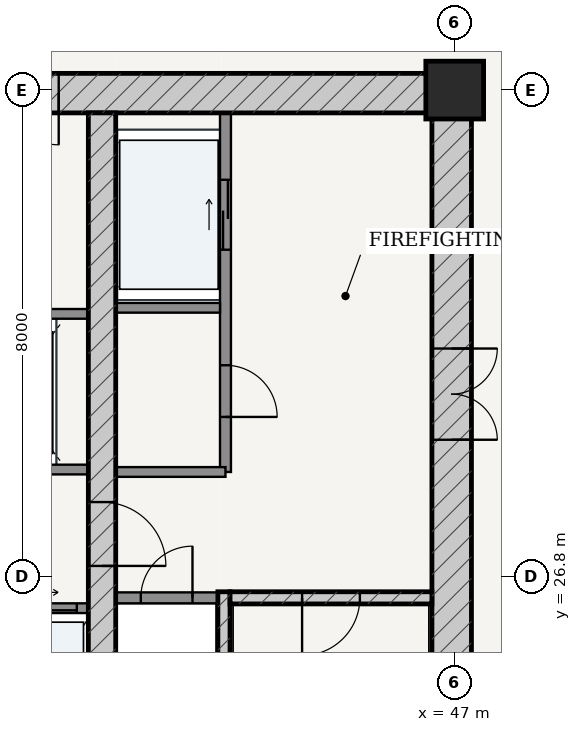
"""IFC4 building model, lengths in metres.
Left out: names, types, materials, properties, quantities, classifications, styles, units other than length and angle.
Written with IfcOpenShell. Run it as: python <this file> out.ifc"""

import sys

from ifc_helpers import new_model, si_unit, direction, frame, frame_2d, origin, origin_2d, place, context, subcontext, project, spatial, rectangle, extrude, source, transform, mapped, element, fill, save


model = new_model("IFC4")
c1 = context("Model", 3, precision=1e-05, world=origin(), true_north=direction((-0.2419218956, 0.970295726276)))
c2 = subcontext(c1, "Body", "Model", "MODEL_VIEW")
j1 = project(units=[si_unit("LENGTHUNIT", "METRE"), si_unit("PLANEANGLEUNIT", "RADIAN")], contexts=[c1])
p1 = place(None, origin())
s1 = spatial("IfcSite", under=j1, at=p1, CompositionType="ELEMENT")
p2 = place(p1, origin())
s2 = spatial("IfcBuilding", under=s1, at=p2, CompositionType="ELEMENT")
p3 = place(p2, frame((0.0, 0.0, 130.2)))
s3 = spatial("IfcBuildingStorey", under=s2, at=p3, CompositionType="ELEMENT", Elevation=130.2)
p4 = place(p3, frame((47.0, 34.8, 0.0), z_axis=(0.0, 0.0, 1.0), x_axis=(1.0, 0.0, 0.0)))
e1 = element("IfcColumn", 1, at=p4, inside=s3, PredefinedType="COLUMN", context=c2, shape_type="SweptSolid", body=[
    extrude(rectangle(XDim=0.95, YDim=0.95, at=origin_2d()), origin(), (0.0, 0.0, 1.0), 5.2),
])
p5 = place(p3, frame((28.725, 34.75, 0.0), z_axis=(0.0, 0.0, 1.0), x_axis=(1.0, 0.0, 0.0)))
e2 = element("IfcWall", 2, at=p5, inside=s3, PredefinedType="SHEAR", context=c2, shape_type="SweptSolid", body=[
    extrude(rectangle(XDim=18.55, YDim=0.65, at=frame_2d((9.275, 0.0))), origin(), (0.0, 0.0, 1.0), 4.93),
])
p6 = place(p5, frame((6.788, 0.0, 0.0)))
e3 = element("IfcOpeningElement", 3, at=p6, cuts=e2, PredefinedType="OPENING", context=c2, shape_type="SweptSolid", body=[
    extrude(rectangle(XDim=0.85, YDim=2.1, at=frame_2d((0.425, 1.05))), frame((0.0, 0.335, 0.0), z_axis=(0.0, -1.0, 0.0), x_axis=(1.0, 0.0, 0.0)), (0.0, 0.0, 1.0), 0.67),
])
p7 = place(p5, frame((8.845, 0.0, 0.0)))
e4 = element("IfcOpeningElement", 4, at=p7, cuts=e2, PredefinedType="OPENING", context=c2, shape_type="SweptSolid", body=[
    extrude(rectangle(XDim=0.86, YDim=2.1, at=frame_2d((0.43, 1.05))), frame((0.0, 0.335, 0.0), z_axis=(0.0, -1.0, 0.0), x_axis=(1.0, 0.0, 0.0)), (0.0, 0.0, 1.0), 0.67),
])
p8 = place(p5, frame((10.913, 0.0, 0.0)))
e5 = element("IfcOpeningElement", 5, at=p8, cuts=e2, PredefinedType="OPENING", context=c2, shape_type="SweptSolid", body=[
    extrude(rectangle(XDim=0.85, YDim=2.1, at=frame_2d((0.425, 1.05))), frame((0.0, 0.335, 0.0), z_axis=(0.0, -1.0, 0.0), x_axis=(1.0, 0.0, 0.0)), (0.0, 0.0, 1.0), 0.67),
])
p9 = place(p3, frame((46.95, 19.175, 0.0), z_axis=(0.0, 0.0, 1.0), x_axis=(0.0, 1.0, 0.0)))
e6 = element("IfcWall", 6, at=p9, inside=s3, PredefinedType="SHEAR", context=c2, shape_type="SweptSolid", body=[
    extrude(rectangle(XDim=15.25, YDim=0.65, at=frame_2d((7.625, 0.0))), origin(), (0.0, 0.0, 1.0), 4.93),
])
p10 = place(p9, frame((9.875, 0.0, 0.0)))
e7 = element("IfcOpeningElement", 7, at=p10, cuts=e6, PredefinedType="OPENING", context=c2, shape_type="SweptSolid", body=[
    extrude(rectangle(XDim=1.5, YDim=2.2, at=frame_2d((0.75, 1.1))), frame((0.0, 0.335, 0.0), z_axis=(0.0, -1.0, 0.0), x_axis=(1.0, 0.0, 0.0)), (0.0, 0.0, 1.0), 0.67),
])
p11 = place(p3, frame((43.205, 19.175, 0.0), z_axis=(0.0, 0.0, 1.0), x_axis=(0.0, 1.0, 0.0)))
e8 = element("IfcWall", 8, at=p11, inside=s3, PredefinedType="SOLIDWALL", context=c2, shape_type="SweptSolid", body=[
    extrude(rectangle(XDim=7.375, YDim=0.2, at=frame_2d((3.688, 0.0))), origin(), (0.0, 0.0, 1.0), 4.93),
])
p12 = place(p3, frame((43.305, 26.45, 0.0), z_axis=(0.0, 0.0, 1.0), x_axis=(1.0, 0.0, 0.0)))
e9 = element("IfcWall", 9, at=p12, inside=s3, PredefinedType="SOLIDWALL", context=c2, shape_type="SweptSolid", body=[
    extrude(rectangle(XDim=3.32, YDim=0.2, at=frame_2d((1.66, 0.0))), origin(), (0.0, 0.0, 1.0), 4.93),
])
p13 = place(p12, frame((1.185, 0.0, 0.0)))
e10 = element("IfcOpeningElement", 10, at=p13, cuts=e9, PredefinedType="OPENING", context=c2, shape_type="SweptSolid", body=[
    extrude(rectangle(XDim=0.95, YDim=2.15, at=frame_2d((0.475, 1.075))), frame((0.0, 0.11, 0.0), z_axis=(0.0, -1.0, 0.0), x_axis=(1.0, 0.0, 0.0)), (0.0, 0.0, 1.0), 0.22),
])
p14 = place(p3, frame((41.2, 19.175, 0.0), z_axis=(0.0, 0.0, 1.0), x_axis=(0.0, 1.0, 0.0)))
e11 = element("IfcWall", 11, at=p14, inside=s3, PredefinedType="SHEAR", context=c2, shape_type="SweptSolid", body=[
    extrude(rectangle(XDim=15.25, YDim=0.45, at=frame_2d((7.625, 0.0))), origin(), (0.0, 0.0, 1.0), 4.93),
])
p15 = place(p14, frame((7.8, 0.0, 0.0)))
e12 = element("IfcOpeningElement", 12, at=p15, cuts=e11, PredefinedType="OPENING", context=c2, shape_type="SweptSolid", body=[
    extrude(rectangle(XDim=1.05, YDim=2.15, at=frame_2d((0.525, 1.075))), frame((0.0, 0.235, 0.0), z_axis=(0.0, -1.0, 0.0), x_axis=(1.0, 0.0, 0.0)), (0.0, 0.0, 1.0), 0.47),
])
p16 = place(p3, frame((41.425, 26.45, 0.0), z_axis=(0.0, 0.0, 1.0), x_axis=(1.0, 0.0, 0.0)))
e13 = element("IfcWall", 13, at=p16, inside=s3, PredefinedType="PARTITIONING", context=c2, shape_type="SweptSolid", body=[
    extrude(rectangle(XDim=1.675, YDim=0.18, at=frame_2d((0.837, 0.0))), origin(), (0.0, 0.0, 1.0), 4.93),
])
p17 = place(p16, frame((0.413, 0.0, 0.0)))
e14 = element("IfcOpeningElement", 14, at=p17, cuts=e13, PredefinedType="OPENING", context=c2, shape_type="SweptSolid", body=[
    extrude(rectangle(XDim=0.85, YDim=2.1, at=frame_2d((0.425, 1.05))), frame((0.0, 0.1, 0.0), z_axis=(0.0, -1.0, 0.0), x_axis=(1.0, 0.0, 0.0)), (0.0, 0.0, 1.0), 0.2),
])
p18 = place(p3, frame((43.23, 28.52, 0.0), z_axis=(0.0, 0.0, 1.0), x_axis=(0.0, 1.0, 0.0)))
e15 = element("IfcWall", 15, at=p18, inside=s3, PredefinedType="PARTITIONING", context=c2, shape_type="SweptSolid", body=[
    extrude(rectangle(XDim=5.905, YDim=0.18, at=frame_2d((2.953, 0.0))), origin(), (0.0, 0.0, 1.0), 4.93),
])
p19 = place(p18, frame((0.905, 0.0, 0.0)))
e16 = element("IfcOpeningElement", 16, at=p19, cuts=e15, PredefinedType="OPENING", context=c2, shape_type="SweptSolid", body=[
    extrude(rectangle(XDim=0.85, YDim=2.1, at=frame_2d((0.425, 1.05))), frame((0.0, 0.1, 0.0), z_axis=(0.0, -1.0, 0.0), x_axis=(1.0, 0.0, 0.0)), (0.0, 0.0, 1.0), 0.2),
])
p20 = place(p18, frame((3.655, 0.0, 0.0)))
e17 = element("IfcOpeningElement", 17, at=p20, cuts=e15, PredefinedType="OPENING", context=c2, shape_type="SweptSolid", body=[
    extrude(rectangle(XDim=1.15, YDim=2.2, at=frame_2d((0.575, 1.1))), frame((0.0, 0.1, 0.0), z_axis=(0.0, -1.0, 0.0), x_axis=(1.0, 0.0, 0.0)), (0.0, 0.0, 1.0), 0.2),
])
p21 = place(p3, frame((41.425, 31.22, 0.0), z_axis=(0.0, 0.0, 1.0), x_axis=(1.0, 0.0, 0.0)))
e18 = element("IfcWall", 18, at=p21, inside=s3, PredefinedType="PARTITIONING", context=c2, shape_type="SweptSolid", body=[
    extrude(rectangle(XDim=1.715, YDim=0.16, at=frame_2d((0.857, 0.0))), origin(), (0.0, 0.0, 1.0), 4.93),
])
p22 = place(p3, frame((41.425, 28.52, 0.0), z_axis=(0.0, 0.0, 1.0), x_axis=(1.0, 0.0, 0.0)))
e19 = element("IfcWall", 19, at=p22, inside=s3, PredefinedType="PARTITIONING", context=c2, shape_type="SweptSolid", body=[
    extrude(rectangle(XDim=1.805, YDim=0.16, at=frame_2d((0.902, 0.0))), origin(), (0.0, 0.0, 1.0), 4.93),
])
p23 = place(p3, frame((35.025, 28.56, 0.0), z_axis=(0.0, 0.0, 1.0), x_axis=(1.0, 0.0, 0.0)))
e20 = element("IfcWall", 20, at=p23, inside=s3, PredefinedType="PARTITIONING", context=c2, shape_type="SweptSolid", body=[
    extrude(rectangle(XDim=5.95, YDim=0.16, at=frame_2d((2.975, 0.0))), origin(), (0.0, 0.0, 1.0), 4.93),
])
p24 = place(p23, frame((0.76, 0.0, 0.0)))
e21 = element("IfcOpeningElement", 21, at=p24, cuts=e20, PredefinedType="OPENING", context=c2, shape_type="SweptSolid", body=[
    extrude(rectangle(XDim=1.1, YDim=2.2, at=frame_2d((0.55, 1.1))), frame((0.0, 0.09, 0.0), z_axis=(0.0, -1.0, 0.0), x_axis=(1.0, 0.0, 0.0)), (0.0, 0.0, 1.0), 0.18),
])
p25 = place(p23, frame((2.425, 0.0, 0.0)))
e22 = element("IfcOpeningElement", 22, at=p25, cuts=e20, PredefinedType="OPENING", context=c2, shape_type="SweptSolid", body=[
    extrude(rectangle(XDim=1.1, YDim=2.2, at=frame_2d((0.55, 1.1))), frame((0.0, 0.09, 0.0), z_axis=(0.0, -1.0, 0.0), x_axis=(1.0, 0.0, 0.0)), (0.0, 0.0, 1.0), 0.18),
])
p26 = place(p23, frame((4.09, 0.0, 0.0)))
e23 = element("IfcOpeningElement", 23, at=p26, cuts=e20, PredefinedType="OPENING", context=c2, shape_type="SweptSolid", body=[
    extrude(rectangle(XDim=1.1, YDim=2.2, at=frame_2d((0.55, 1.1))), frame((0.0, 0.09, 0.0), z_axis=(0.0, -1.0, 0.0), x_axis=(1.0, 0.0, 0.0)), (0.0, 0.0, 1.0), 0.18),
])
p27 = place(p3, frame((35.025, 31.12, 0.0), z_axis=(0.0, 0.0, 1.0), x_axis=(1.0, 0.0, 0.0)))
e24 = element("IfcWall", 24, at=p27, inside=s3, PredefinedType="PARTITIONING", context=c2, shape_type="SweptSolid", body=[
    extrude(rectangle(XDim=5.95, YDim=0.16, at=frame_2d((2.975, 0.0))), origin(), (0.0, 0.0, 1.0), 4.93),
])
p28 = place(p3, frame((35.025, 26.28, 0.0), z_axis=(0.0, 0.0, 1.0), x_axis=(1.0, 0.0, 0.0)))
e25 = element("IfcWall", 25, at=p28, inside=s3, PredefinedType="PARTITIONING", context=c2, shape_type="SweptSolid", body=[
    extrude(rectangle(XDim=5.95, YDim=0.16, at=frame_2d((2.975, 0.0))), origin(), (0.0, 0.0, 1.0), 4.93),
])
p29 = place(p28, frame((0.19, 0.0, 0.0)))
e26 = element("IfcOpeningElement", 26, at=p29, cuts=e25, PredefinedType="OPENING", context=c2, shape_type="SweptSolid", body=[
    extrude(rectangle(XDim=1.1, YDim=2.2, at=frame_2d((0.55, 1.1))), frame((0.0, 0.09, 0.0), z_axis=(0.0, -1.0, 0.0), x_axis=(1.0, 0.0, 0.0)), (0.0, 0.0, 1.0), 0.18),
])
p30 = place(p28, frame((1.67, 0.0, 0.0)))
e27 = element("IfcOpeningElement", 27, at=p30, cuts=e25, PredefinedType="OPENING", context=c2, shape_type="SweptSolid", body=[
    extrude(rectangle(XDim=1.1, YDim=2.2, at=frame_2d((0.55, 1.1))), frame((0.0, 0.09, 0.0), z_axis=(0.0, -1.0, 0.0), x_axis=(1.0, 0.0, 0.0)), (0.0, 0.0, 1.0), 0.18),
])
p31 = place(p28, frame((3.18, 0.0, 0.0)))
e28 = element("IfcOpeningElement", 28, at=p31, cuts=e25, PredefinedType="OPENING", context=c2, shape_type="SweptSolid", body=[
    extrude(rectangle(XDim=1.1, YDim=2.2, at=frame_2d((0.55, 1.1))), frame((0.0, 0.09, 0.0), z_axis=(0.0, -1.0, 0.0), x_axis=(1.0, 0.0, 0.0)), (0.0, 0.0, 1.0), 0.18),
])
p32 = place(p28, frame((4.66, 0.0, 0.0)))
e29 = element("IfcOpeningElement", 29, at=p32, cuts=e25, PredefinedType="OPENING", context=c2, shape_type="SweptSolid", body=[
    extrude(rectangle(XDim=1.1, YDim=2.2, at=frame_2d((0.55, 1.1))), frame((0.0, 0.09, 0.0), z_axis=(0.0, -1.0, 0.0), x_axis=(1.0, 0.0, 0.0)), (0.0, 0.0, 1.0), 0.18),
])
m1 = source(origin(), c2, "Body", "SweptSolid", [
    extrude(rectangle(XDim=1.5, YDim=2.2, at=frame_2d((0.75, 1.1))), frame((0.0, 0.025, 0.0), z_axis=(0.0, -1.0, 0.0), x_axis=(1.0, 0.0, 0.0)), (0.0, 0.0, 1.0), 0.05),
])
p33 = place(p10, frame((1.5, 0.0, 0.0), z_axis=(0.0, 0.0, 1.0), x_axis=(-1.0, 0.0, 0.0)))
e30 = element("IfcDoor", 30, at=p33, inside=s3, OperationType="DOUBLE_DOOR_SINGLE_SWING", PredefinedType="DOOR", context=c2, shape_type="MappedRepresentation", body=[
    mapped(m1, transform((0.0, 0.0, 0.0), scale=1.0)),
])
fill(e7, e30)
m2 = source(origin(), c2, "Body", "SweptSolid", [
    extrude(rectangle(XDim=1.05, YDim=2.15, at=frame_2d((0.525, 1.075))), frame((0.0, 0.025, 0.0), z_axis=(0.0, -1.0, 0.0), x_axis=(1.0, 0.0, 0.0)), (0.0, 0.0, 1.0), 0.05),
])
p34 = place(p15, frame((1.05, 0.0, 0.0), z_axis=(0.0, 0.0, 1.0), x_axis=(-1.0, 0.0, 0.0)))
e31 = element("IfcDoor", 31, at=p34, inside=s3, OperationType="SINGLE_SWING_RIGHT", PredefinedType="DOOR", context=c2, shape_type="MappedRepresentation", body=[
    mapped(m2, transform((0.0, 0.0, 0.0), scale=1.0)),
])
fill(e12, e31)
m3 = source(origin(), c2, "Body", "SweptSolid", [
    extrude(rectangle(XDim=0.95, YDim=2.15, at=frame_2d((0.475, 1.075))), frame((0.0, 0.025, 0.0), z_axis=(0.0, -1.0, 0.0), x_axis=(1.0, 0.0, 0.0)), (0.0, 0.0, 1.0), 0.05),
])
p35 = place(p13, frame((0.95, 0.0, 0.0), z_axis=(0.0, 0.0, 1.0), x_axis=(-1.0, 0.0, 0.0)))
e32 = element("IfcDoor", 32, at=p35, inside=s3, OperationType="SINGLE_SWING_RIGHT", PredefinedType="DOOR", context=c2, shape_type="MappedRepresentation", body=[
    mapped(m3, transform((0.0, 0.0, 0.0), scale=1.0)),
])
fill(e10, e32)
m4 = source(origin(), c2, "Body", "SweptSolid", [
    extrude(rectangle(XDim=0.85, YDim=2.1, at=frame_2d((0.425, 1.05))), frame((0.0, 0.025, 0.0), z_axis=(0.0, -1.0, 0.0), x_axis=(1.0, 0.0, 0.0)), (0.0, 0.0, 1.0), 0.05),
])
p36 = place(p17, origin())
e33 = element("IfcDoor", 33, at=p36, inside=s3, OperationType="SINGLE_SWING_RIGHT", PredefinedType="DOOR", context=c2, shape_type="MappedRepresentation", body=[
    mapped(m4, transform((0.0, 0.0, 0.0), scale=1.0)),
])
fill(e14, e33)
p37 = place(p19, frame((0.85, 0.0, 0.0), z_axis=(0.0, 0.0, 1.0), x_axis=(-1.0, 0.0, 0.0)))
e34 = element("IfcDoor", 34, at=p37, inside=s3, OperationType="SINGLE_SWING_RIGHT", PredefinedType="DOOR", context=c2, shape_type="MappedRepresentation", body=[
    mapped(m4, transform((0.0, 0.0, 0.0), scale=1.0)),
])
fill(e16, e34)
p38 = place(p8, frame((0.85, 0.0, 0.0), z_axis=(0.0, 0.0, 1.0), x_axis=(-1.0, 0.0, 0.0)))
e35 = element("IfcDoor", 35, at=p38, inside=s3, OperationType="SINGLE_SWING_LEFT", PredefinedType="DOOR", context=c2, shape_type="MappedRepresentation", body=[
    mapped(m4, transform((0.0, 0.0, 0.0), scale=1.0)),
])
fill(e5, e35)
m5 = source(origin(), c2, "Body", "SweptSolid", [
    extrude(rectangle(XDim=1.15, YDim=2.2, at=frame_2d((0.575, 1.1))), frame((0.0, 0.025, 0.0), z_axis=(0.0, -1.0, 0.0), x_axis=(1.0, 0.0, 0.0)), (0.0, 0.0, 1.0), 0.05),
])
p39 = place(p20, origin())
e36 = element("IfcDoor", 36, at=p39, inside=s3, OperationType="DOUBLE_DOOR_SLIDING", PredefinedType="DOOR", context=c2, shape_type="MappedRepresentation", body=[
    mapped(m5, transform((0.0, 0.0, 0.0), scale=1.0)),
])
fill(e17, e36)
m6 = source(origin(), c2, "Body", "SweptSolid", [
    extrude(rectangle(XDim=1.1, YDim=2.2, at=frame_2d((0.55, 1.1))), frame((0.0, 0.025, 0.0), z_axis=(0.0, -1.0, 0.0), x_axis=(1.0, 0.0, 0.0)), (0.0, 0.0, 1.0), 0.05),
])
p40 = place(p32, origin())
e37 = element("IfcDoor", 37, at=p40, inside=s3, OperationType="DOUBLE_DOOR_SLIDING", PredefinedType="DOOR", context=c2, shape_type="MappedRepresentation", body=[
    mapped(m6, transform((0.0, 0.0, 0.0), scale=1.0)),
])
fill(e29, e37)
save(model, sys.argv[1])
